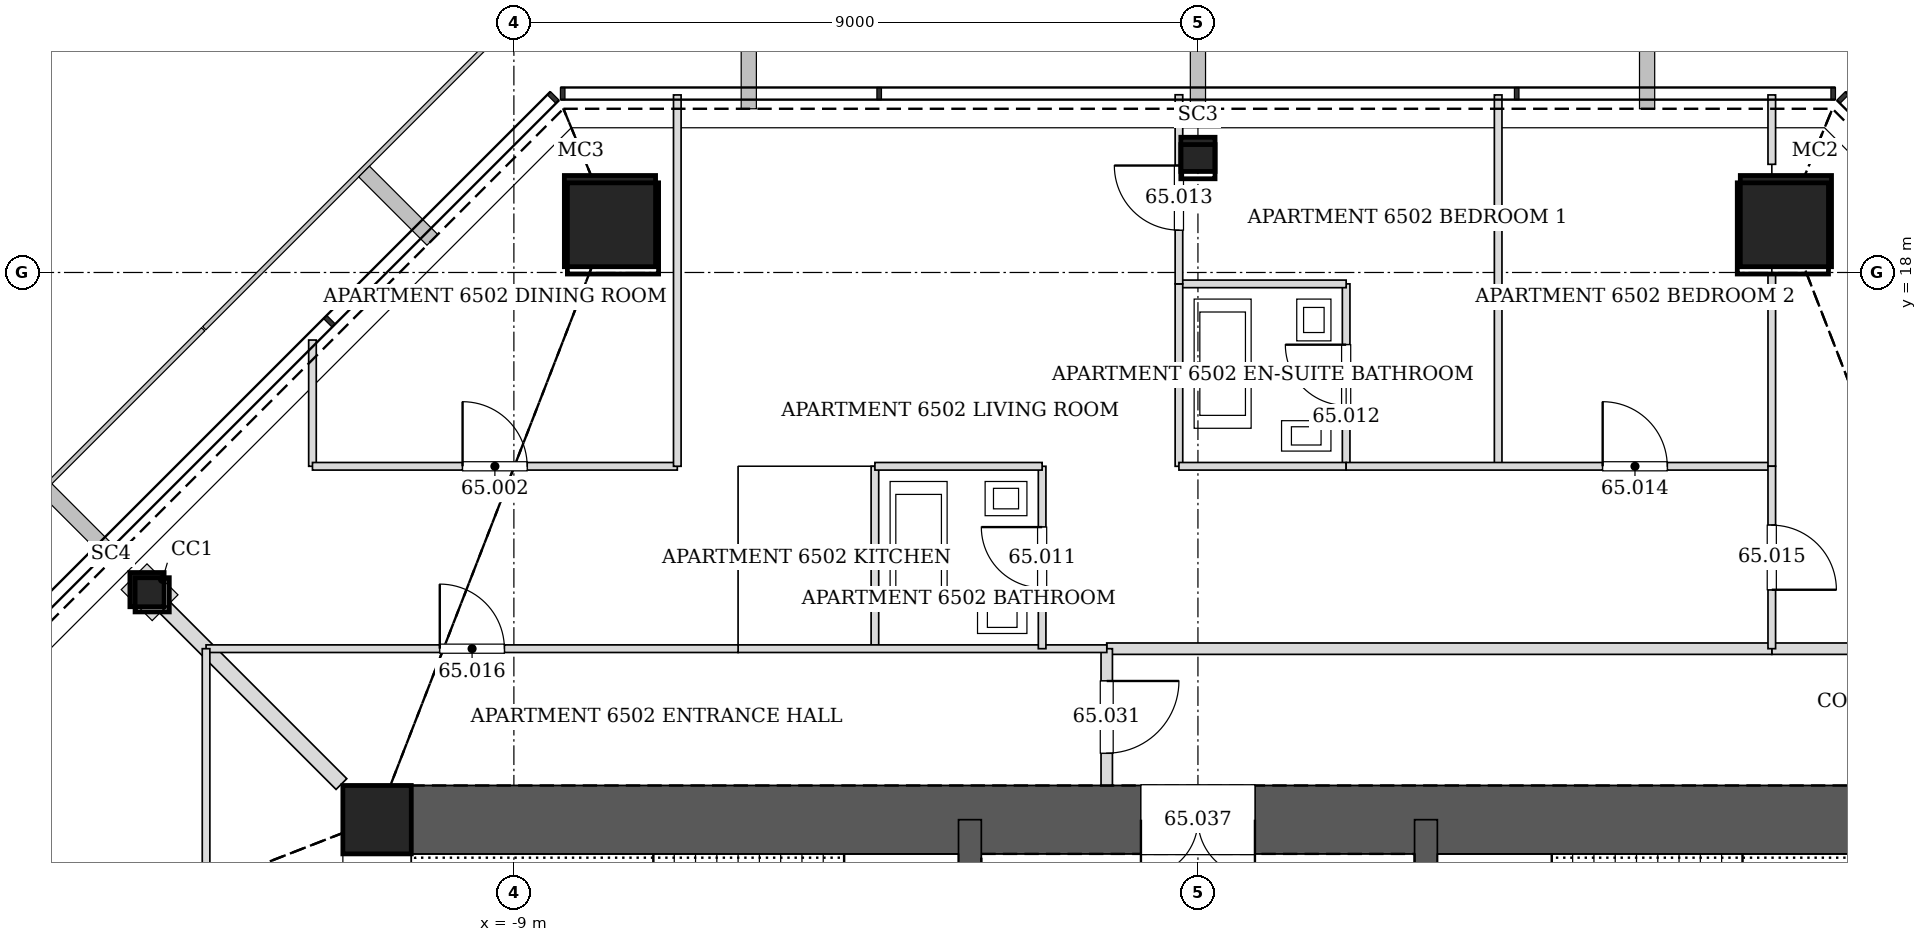
"""IFC4 building model, lengths in metres.
Left out: names, types, materials, properties, quantities, classifications, styles, units other than length and angle.
Written with IfcOpenShell. Run it as: python <this file> out.ifc"""

import sys

from ifc_helpers import new_model, si_unit, direction, frame, frame_2d, origin, origin_2d, place, context, subcontext, project, spatial, rectangle, hollow_rectangle, extrude, element, fill, save


model = new_model("IFC4")
c1 = context("Model", 3, precision=1e-05, world=origin(), true_north=direction((0.0, 1.0)))
c2 = subcontext(c1, "Body", "Model", "MODEL_VIEW")
j1 = project(units=[si_unit("LENGTHUNIT", "METRE"), si_unit("PLANEANGLEUNIT", "RADIAN")], contexts=[c1])
p1 = place(None, origin())
s1 = spatial("IfcSite", under=j1, at=p1, CompositionType="ELEMENT")
p2 = place(p1, origin())
s2 = spatial("IfcBuilding", under=s1, at=p2, CompositionType="ELEMENT")
p3 = place(p2, frame((0.0, 0.0, 270.8)))
s3 = spatial("IfcBuildingStorey", under=s2, at=p3, CompositionType="ELEMENT", Elevation=270.8)
for number, where, z_axis, x_axis in (
    (1, (7.736, 18.676, 0.0), (-0.012, -0.028, 1.0), (0.924, -0.382, 0.0)),
    (2, (-7.736, 18.676, 0.0), (0.012, -0.028, 1.0), (0.924, 0.382, 0.0)),
):
    element("IfcColumn", number, at=place(p3, frame(where, z_axis=z_axis, x_axis=x_axis)), inside=s3, PredefinedType="COLUMN", context=c2, shape_type="SweptSolid", body=[
        extrude(hollow_rectangle(XDim=1.2, YDim=1.2, WallThickness=0.055, at=origin_2d()), origin(), (0.0, 0.0, 1.0), 3.402),
    ])
for number, where, z_axis, x_axis in (
    (3, (0.0, 19.554, 0.0), (0.0, -0.028, 1.0), (1.0, 0.0, 0.0)),
    (4, (-13.827, 13.827, 0.0), (0.02, -0.02, 1.0), (0.707, 0.707, 0.0)),
):
    element("IfcColumn", number, at=place(p3, frame(where, z_axis=z_axis, x_axis=x_axis)), inside=s3, PredefinedType="COLUMN", context=c2, shape_type="SweptSolid", body=[
        extrude(hollow_rectangle(XDim=0.45, YDim=0.45, WallThickness=0.02, at=origin_2d()), origin(), (0.0, 0.0, 1.0), 3.401),
    ])
p4 = place(p3, frame((-10.8, 10.8, 0.0), z_axis=(0.0, 0.0, 1.0), x_axis=(1.0, 0.0, 0.0)))
e5 = element("IfcColumn", 5, at=p4, inside=s3, PredefinedType="COLUMN", context=c2, shape_type="SweptSolid", body=[
    extrude(hollow_rectangle(XDim=0.9, YDim=0.9, WallThickness=0.04, at=origin_2d()), origin(), (0.0, 0.0, 1.0), 3.4),
])
p5 = place(p3, frame((10.8, 10.8, 0.0), z_axis=(0.0, 0.0, 1.0), x_axis=(-1.0, 0.0, 0.0)))
e6 = element("IfcWall", 6, at=p5, inside=s3, PredefinedType="SOLIDWALL", context=c2, shape_type="SweptSolid", body=[
    extrude(rectangle(XDim=21.6, YDim=0.9, at=frame_2d((10.8, 0.0))), origin(), (0.0, 0.0, 1.0), 3.4),
])
p6 = place(p5, frame((10.05, 0.0, 0.0)))
e7 = element("IfcOpeningElement", 7, at=p6, cuts=e6, PredefinedType="OPENING", context=c2, shape_type="SweptSolid", body=[
    extrude(rectangle(XDim=1.5, YDim=2.1, at=frame_2d((0.75, 1.05))), frame((0.0, 0.46, 0.0), z_axis=(0.0, -1.0, 0.0), x_axis=(1.0, 0.0, 0.0)), (0.0, 0.0, 1.0), 0.92),
])
p7 = place(p3, frame((-10.8, 10.8, 0.0), z_axis=(0.0, 0.0, 1.0), x_axis=(0.0, -1.0, 0.0)))
e8 = element("IfcWall", 8, at=p7, inside=s3, PredefinedType="SOLIDWALL", context=c2, shape_type="SweptSolid", body=[
    extrude(rectangle(XDim=21.6, YDim=0.9, at=frame_2d((10.8, 0.0))), origin(), (0.0, 0.0, 1.0), 3.4),
])
p8 = place(p7, frame((8.7, 0.0, 0.0)))
e9 = element("IfcOpeningElement", 9, at=p8, cuts=e8, PredefinedType="OPENING", context=c2, shape_type="SweptSolid", body=[
    extrude(rectangle(XDim=1.2, YDim=2.1, at=frame_2d((0.6, 1.05))), frame((0.0, 0.46, 0.0), z_axis=(0.0, -1.0, 0.0), x_axis=(1.0, 0.0, 0.0)), (0.0, 0.0, 1.0), 0.92),
])
p9 = place(p7, frame((11.7, 0.0, 0.0)))
e10 = element("IfcOpeningElement", 10, at=p9, cuts=e8, PredefinedType="OPENING", context=c2, shape_type="SweptSolid", body=[
    extrude(rectangle(XDim=1.2, YDim=2.1, at=frame_2d((0.6, 1.05))), frame((0.0, 0.46, 0.0), z_axis=(0.0, -1.0, 0.0), x_axis=(1.0, 0.0, 0.0)), (0.0, 0.0, 1.0), 0.92),
])
p10 = place(p3, frame((-3.0, 6.0, 0.0), z_axis=(0.0, 0.0, 1.0), x_axis=(0.0, 1.0, 0.0)))
e11 = element("IfcWall", 11, at=p10, inside=s3, PredefinedType="SOLIDWALL", context=c2, shape_type="SweptSolid", body=[
    extrude(rectangle(XDim=4.8, YDim=0.3, at=frame_2d((2.4, 0.0))), origin(), (0.0, 0.0, 1.0), 3.4),
])
p11 = place(p10, frame((1.75, 0.0, 0.0)))
e12 = element("IfcOpeningElement", 12, at=p11, cuts=e11, PredefinedType="OPENING", context=c2, shape_type="SweptSolid", body=[
    extrude(rectangle(XDim=1.0, YDim=2.1, at=frame_2d((0.5, 1.05))), frame((0.0, 0.16, 0.0), z_axis=(0.0, -1.0, 0.0), x_axis=(1.0, 0.0, 0.0)), (0.0, 0.0, 1.0), 0.32),
])
p12 = place(p3, frame((3.0, 6.0, 0.0), z_axis=(0.0, 0.0, 1.0), x_axis=(0.0, 1.0, 0.0)))
e13 = element("IfcWall", 13, at=p12, inside=s3, PredefinedType="SOLIDWALL", context=c2, shape_type="SweptSolid", body=[
    extrude(rectangle(XDim=4.8, YDim=0.3, at=frame_2d((2.4, 0.0))), origin(), (0.0, 0.0, 1.0), 3.4),
])
p13 = place(p12, frame((1.75, 0.0, 0.0)))
e14 = element("IfcOpeningElement", 14, at=p13, cuts=e13, PredefinedType="OPENING", context=c2, shape_type="SweptSolid", body=[
    extrude(rectangle(XDim=1.0, YDim=2.1, at=frame_2d((0.5, 1.05))), frame((0.0, 0.16, 0.0), z_axis=(0.0, -1.0, 0.0), x_axis=(1.0, 0.0, 0.0)), (0.0, 0.0, 1.0), 0.32),
])
p14 = place(p3, frame((13.05, 13.05, 0.0), z_axis=(0.0, 0.0, 1.0), x_axis=(-1.0, 0.0, 0.0)))
e15 = element("IfcWall", 15, at=p14, inside=s3, PredefinedType="PARTITIONING", context=c2, shape_type="SweptSolid", body=[
    extrude(rectangle(XDim=5.501, YDim=0.15, at=frame_2d((2.75, 0.0))), origin(), (0.0, 0.0, 1.0), 2.349),
])
p15 = place(p3, frame((7.551, 13.05, 0.0), z_axis=(0.0, 0.0, 1.0), x_axis=(-1.0, 0.0, 0.0)))
e16 = element("IfcWall", 16, at=p15, inside=s3, PredefinedType="PARTITIONING", context=c2, shape_type="SweptSolid", body=[
    extrude(rectangle(XDim=8.751, YDim=0.15, at=frame_2d((4.375, 0.0))), origin(), (0.0, 0.0, 1.0), 2.344),
])
p16 = place(p3, frame((-1.2, 13.05, 0.0), z_axis=(0.0, 0.0, 1.0), x_axis=(0.0, -1.0, 0.0)))
e17 = element("IfcWall", 17, at=p16, inside=s3, PredefinedType="PARTITIONING", context=c2, shape_type="SweptSolid", body=[
    extrude(rectangle(XDim=1.8, YDim=0.15, at=frame_2d((0.9, 0.0))), origin(), (0.0, 0.0, 1.0), 3.2),
])
p17 = place(p16, frame((0.425, 0.0, 0.0)))
e18 = element("IfcOpeningElement", 18, at=p17, cuts=e17, PredefinedType="OPENING", context=c2, shape_type="SweptSolid", body=[
    extrude(rectangle(XDim=0.95, YDim=2.1, at=frame_2d((0.475, 1.05))), frame((0.0, 0.085, 0.0), z_axis=(0.0, -1.0, 0.0), x_axis=(1.0, 0.0, 0.0)), (0.0, 0.0, 1.0), 0.17),
])
p18 = place(p3, frame((-11.65, 17.111, 0.0), z_axis=(0.0, 0.0, 1.0), x_axis=(0.0, -1.0, 0.0)))
e19 = element("IfcWall", 19, at=p18, inside=s3, PredefinedType="PARTITIONING", context=c2, shape_type="SweptSolid", body=[
    extrude(rectangle(XDim=1.661, YDim=0.1, at=frame_2d((0.831, 0.0))), origin(), (0.0, 0.0, 1.0), 2.74),
])
p19 = place(p3, frame((-11.65, 15.45, 0.0), z_axis=(0.0, 0.0, 1.0), x_axis=(1.0, 0.0, 0.0)))
e20 = element("IfcWall", 20, at=p19, inside=s3, PredefinedType="PARTITIONING", context=c2, shape_type="SweptSolid", body=[
    extrude(rectangle(XDim=4.8, YDim=0.1, at=frame_2d((2.4, 0.0))), origin(), (0.0, 0.0, 1.0), 2.349),
])
p20 = place(p19, frame((1.975, 0.0, 0.0)))
e21 = element("IfcOpeningElement", 21, at=p20, cuts=e20, PredefinedType="OPENING", context=c2, shape_type="SweptSolid", body=[
    extrude(rectangle(XDim=0.85, YDim=2.1, at=frame_2d((0.425, 1.05))), frame((0.0, 0.06, 0.0), z_axis=(0.0, -1.0, 0.0), x_axis=(1.0, 0.0, 0.0)), (0.0, 0.0, 1.0), 0.12),
])
p21 = place(p3, frame((-6.85, 15.45, 0.0), z_axis=(0.0, 0.0, 1.0), x_axis=(0.0, 1.0, 0.0)))
e22 = element("IfcWall", 22, at=p21, inside=s3, PredefinedType="PARTITIONING", context=c2, shape_type="SweptSolid", body=[
    extrude(rectangle(XDim=4.886, YDim=0.1, at=frame_2d((2.443, 0.0))), origin(), (0.0, 0.0, 1.0), 2.591),
])
p22 = place(p3, frame((-4.25, 13.05, 0.0), z_axis=(0.0, 0.0, 1.0), x_axis=(0.0, 1.0, 0.0)))
e23 = element("IfcWall", 23, at=p22, inside=s3, PredefinedType="PARTITIONING", context=c2, shape_type="SweptSolid", body=[
    extrude(rectangle(XDim=2.4, YDim=0.1, at=frame_2d((1.2, 0.0))), origin(), (0.0, 0.0, 1.0), 2.591),
])
p23 = place(p3, frame((-6.05, 13.05, 0.0), z_axis=(0.0, 0.0, 1.0), x_axis=(1.0, 0.0, 0.0)))
e24 = element("IfcWall", 24, at=p23, inside=s3, PredefinedType="PARTITIONING", context=c2, shape_type="SweptSolid", body=[
    extrude(rectangle(XDim=4.851, YDim=0.1, at=frame_2d((2.426, 0.0))), origin(), (0.0, 0.0, 1.0), 3.2),
])
p24 = place(p3, frame((-2.05, 13.05, 0.0), z_axis=(0.0, 0.0, 1.0), x_axis=(0.0, 1.0, 0.0)))
e25 = element("IfcWall", 25, at=p24, inside=s3, PredefinedType="PARTITIONING", context=c2, shape_type="SweptSolid", body=[
    extrude(rectangle(XDim=2.4, YDim=0.1, at=frame_2d((1.2, 0.0))), origin(), (0.0, 0.0, 1.0), 2.591),
])
p25 = place(p24, frame((0.8, 0.0, 0.0)))
e26 = element("IfcOpeningElement", 26, at=p25, cuts=e25, PredefinedType="OPENING", context=c2, shape_type="SweptSolid", body=[
    extrude(rectangle(XDim=0.8, YDim=2.1, at=frame_2d((0.4, 1.05))), frame((0.0, 0.06, 0.0), z_axis=(0.0, -1.0, 0.0), x_axis=(1.0, 0.0, 0.0)), (0.0, 0.0, 1.0), 0.12),
])
p26 = place(p3, frame((-2.05, 15.45, 0.0), z_axis=(0.0, 0.0, 1.0), x_axis=(-1.0, 0.0, 0.0)))
e27 = element("IfcWall", 27, at=p26, inside=s3, PredefinedType="PARTITIONING", context=c2, shape_type="SweptSolid", body=[
    extrude(rectangle(XDim=2.2, YDim=0.1, at=frame_2d((1.1, 0.0))), origin(), (0.0, 0.0, 1.0), 3.2),
])
p27 = place(p3, frame((1.95, 15.45, 0.0), z_axis=(0.0, 0.0, 1.0), x_axis=(0.0, 1.0, 0.0)))
e28 = element("IfcWall", 28, at=p27, inside=s3, PredefinedType="PARTITIONING", context=c2, shape_type="SweptSolid", body=[
    extrude(rectangle(XDim=2.4, YDim=0.1, at=frame_2d((1.2, 0.0))), origin(), (0.0, 0.0, 1.0), 2.591),
])
p28 = place(p27, frame((0.8, 0.0, 0.0)))
e29 = element("IfcOpeningElement", 29, at=p28, cuts=e28, PredefinedType="OPENING", context=c2, shape_type="SweptSolid", body=[
    extrude(rectangle(XDim=0.8, YDim=2.1, at=frame_2d((0.4, 1.05))), frame((0.0, 0.06, 0.0), z_axis=(0.0, -1.0, 0.0), x_axis=(1.0, 0.0, 0.0)), (0.0, 0.0, 1.0), 0.12),
])
p29 = place(p3, frame((1.95, 17.85, 0.0), z_axis=(0.0, 0.0, 1.0), x_axis=(-1.0, 0.0, 0.0)))
e30 = element("IfcWall", 30, at=p29, inside=s3, PredefinedType="PARTITIONING", context=c2, shape_type="SweptSolid", body=[
    extrude(rectangle(XDim=2.2, YDim=0.1, at=frame_2d((1.1, 0.0))), origin(), (0.0, 0.0, 1.0), 2.344),
])
p30 = place(p3, frame((-0.25, 17.85, 0.0), z_axis=(0.0, 0.0, 1.0), x_axis=(0.0, -1.0, 0.0)))
e31 = element("IfcWall", 31, at=p30, inside=s3, PredefinedType="PARTITIONING", context=c2, shape_type="SweptSolid", body=[
    extrude(rectangle(XDim=2.4, YDim=0.1, at=frame_2d((1.2, 0.0))), origin(), (0.0, 0.0, 1.0), 2.591),
])
p31 = place(p3, frame((-0.25, 15.45, 0.0), z_axis=(0.0, 0.0, 1.0), x_axis=(1.0, 0.0, 0.0)))
e32 = element("IfcWall", 32, at=p31, inside=s3, PredefinedType="PARTITIONING", context=c2, shape_type="SweptSolid", body=[
    extrude(rectangle(XDim=2.2, YDim=0.1, at=frame_2d((1.1, 0.0))), origin(), (0.0, 0.0, 1.0), 2.344),
])
p32 = place(p3, frame((3.95, 15.45, 0.0), z_axis=(0.0, 0.0, 1.0), x_axis=(0.0, 1.0, 0.0)))
e33 = element("IfcWall", 33, at=p32, inside=s3, PredefinedType="PARTITIONING", context=c2, shape_type="SweptSolid", body=[
    extrude(rectangle(XDim=4.886, YDim=0.1, at=frame_2d((2.443, 0.0))), origin(), (0.0, 0.0, 1.0), 2.591),
])
p33 = place(p3, frame((-0.25, 20.338, 0.0), z_axis=(0.0, 0.0, 1.0), x_axis=(0.0, -1.0, 0.0)))
e34 = element("IfcWall", 34, at=p33, inside=s3, PredefinedType="PARTITIONING", context=c2, shape_type="SweptSolid", body=[
    extrude(rectangle(XDim=2.488, YDim=0.1, at=frame_2d((1.244, 0.0))), origin(), (0.0, 0.0, 1.0), 2.74),
])
p34 = place(p33, frame((0.931, 0.0, 0.0)))
e35 = element("IfcOpeningElement", 35, at=p34, cuts=e34, PredefinedType="OPENING", context=c2, shape_type="SweptSolid", body=[
    extrude(rectangle(XDim=0.85, YDim=2.1, at=frame_2d((0.425, 1.05))), frame((0.0, 0.06, 0.0), z_axis=(0.0, -1.0, 0.0), x_axis=(1.0, 0.0, 0.0)), (0.0, 0.0, 1.0), 0.12),
])
p35 = place(p3, frame((1.95, 15.45, 0.0), z_axis=(0.0, 0.0, 1.0), x_axis=(1.0, 0.0, 0.0)))
e36 = element("IfcWall", 36, at=p35, inside=s3, PredefinedType="PARTITIONING", context=c2, shape_type="SweptSolid", body=[
    extrude(rectangle(XDim=5.6, YDim=0.1, at=frame_2d((2.8, 0.0))), origin(), (0.0, 0.0, 1.0), 3.2),
])
p36 = place(p35, frame((3.375, 0.0, 0.0)))
e37 = element("IfcOpeningElement", 37, at=p36, cuts=e36, PredefinedType="OPENING", context=c2, shape_type="SweptSolid", body=[
    extrude(rectangle(XDim=0.85, YDim=2.1, at=frame_2d((0.425, 1.05))), frame((0.0, 0.06, 0.0), z_axis=(0.0, -1.0, 0.0), x_axis=(1.0, 0.0, 0.0)), (0.0, 0.0, 1.0), 0.12),
])
p37 = place(p3, frame((7.55, 15.45, 0.0), z_axis=(0.0, 0.0, 1.0), x_axis=(0.0, 1.0, 0.0)))
e38 = element("IfcWall", 38, at=p37, inside=s3, PredefinedType="PARTITIONING", context=c2, shape_type="SweptSolid", body=[
    extrude(rectangle(XDim=2.52, YDim=0.1, at=frame_2d((1.26, 0.0))), origin(), (0.0, 0.0, 1.0), 2.591),
])
p38 = place(p3, frame((7.55, 19.423, 0.0), z_axis=(0.0, 0.0, 1.0), x_axis=(0.0, 1.0, 0.0)))
e39 = element("IfcWall", 39, at=p38, inside=s3, PredefinedType="PARTITIONING", context=c2, shape_type="SweptSolid", body=[
    extrude(rectangle(XDim=0.913, YDim=0.1, at=frame_2d((0.457, 0.0))), origin(), (0.0, 0.0, 1.0), 3.2),
])
p39 = place(p3, frame((7.55, 15.451, 0.0), z_axis=(0.0, 0.0, 1.0), x_axis=(0.0, -1.0, 0.0)))
e40 = element("IfcWall", 40, at=p39, inside=s3, PredefinedType="PARTITIONING", context=c2, shape_type="SweptSolid", body=[
    extrude(rectangle(XDim=2.401, YDim=0.1, at=frame_2d((1.2, 0.0))), origin(), (0.0, 0.0, 1.0), 2.591),
])
p40 = place(p39, frame((0.775, 0.0, 0.0)))
e41 = element("IfcOpeningElement", 41, at=p40, cuts=e40, PredefinedType="OPENING", context=c2, shape_type="SweptSolid", body=[
    extrude(rectangle(XDim=0.85, YDim=2.1, at=frame_2d((0.425, 1.05))), frame((0.0, 0.06, 0.0), z_axis=(0.0, -1.0, 0.0), x_axis=(1.0, 0.0, 0.0)), (0.0, 0.0, 1.0), 0.12),
])
p41 = place(p3, frame((-13.586, 13.586, 0.0), z_axis=(0.0, 0.0, 1.0), x_axis=(0.707106781187, -0.707106781187, 0.0)))
e42 = element("IfcWall", 42, at=p41, inside=s3, PredefinedType="PARTITIONING", context=c2, shape_type="SweptSolid", body=[
    extrude(rectangle(XDim=3.277, YDim=0.2, at=frame_2d((1.638, 0.0))), origin(), (0.0, 0.0, 1.0), 2.591),
])
p42 = place(p3, frame((-13.05, 13.05, 0.0), z_axis=(0.0, 0.0, 1.0), x_axis=(1.0, 0.0, 0.0)))
e43 = element("IfcWall", 43, at=p42, inside=s3, PredefinedType="PARTITIONING", context=c2, shape_type="SweptSolid", body=[
    extrude(rectangle(XDim=7.0, YDim=0.1, at=frame_2d((3.5, 0.0))), origin(), (0.0, 0.0, 1.0), 2.349),
])
p43 = place(p42, frame((3.075, 0.0, 0.0)))
e44 = element("IfcOpeningElement", 44, at=p43, cuts=e43, PredefinedType="OPENING", context=c2, shape_type="SweptSolid", body=[
    extrude(rectangle(XDim=0.85, YDim=2.1, at=frame_2d((0.425, 1.05))), frame((0.0, 0.06, 0.0), z_axis=(0.0, -1.0, 0.0), x_axis=(1.0, 0.0, 0.0)), (0.0, 0.0, 1.0), 0.12),
])
p44 = place(p3, frame((-13.05, 6.05, 0.0), z_axis=(0.0, 0.0, 1.0), x_axis=(0.0, 1.0, 0.0)))
e45 = element("IfcWall", 45, at=p44, inside=s3, PredefinedType="PARTITIONING", context=c2, shape_type="SweptSolid", body=[
    extrude(rectangle(XDim=7.0, YDim=0.1, at=frame_2d((3.5, 0.0))), origin(), (0.0, 0.0, 1.0), 2.349),
])
p45 = place(p44, frame((3.075, 0.0, 0.0)))
e46 = element("IfcOpeningElement", 46, at=p45, cuts=e45, PredefinedType="OPENING", context=c2, shape_type="SweptSolid", body=[
    extrude(rectangle(XDim=0.85, YDim=2.1, at=frame_2d((0.425, 1.05))), frame((0.0, 0.06, 0.0), z_axis=(0.0, -1.0, 0.0), x_axis=(1.0, 0.0, 0.0)), (0.0, 0.0, 1.0), 0.12),
])
p46 = place(p20, origin())
e47 = element("IfcDoor", 47, at=p46, inside=s3, OperationType="SINGLE_SWING_LEFT", PredefinedType="DOOR", context=c2, shape_type="SweptSolid", body=[
    extrude(rectangle(XDim=0.85, YDim=2.1, at=frame_2d((0.425, 1.05))), frame((0.0, 0.025, 0.0), z_axis=(0.0, -1.0, 0.0), x_axis=(1.0, 0.0, 0.0)), (0.0, 0.0, 1.0), 0.05),
])
fill(e21, e47)
p47 = place(p25, origin())
e48 = element("IfcDoor", 48, at=p47, inside=s3, OperationType="SINGLE_SWING_RIGHT", PredefinedType="DOOR", context=c2, shape_type="SweptSolid", body=[
    extrude(rectangle(XDim=0.8, YDim=2.1, at=frame_2d((0.4, 1.05))), frame((0.0, 0.025, 0.0), z_axis=(0.0, -1.0, 0.0), x_axis=(1.0, 0.0, 0.0)), (0.0, 0.0, 1.0), 0.05),
])
fill(e26, e48)
p48 = place(p28, origin())
e49 = element("IfcDoor", 49, at=p48, inside=s3, OperationType="SINGLE_SWING_RIGHT", PredefinedType="DOOR", context=c2, shape_type="SweptSolid", body=[
    extrude(rectangle(XDim=0.8, YDim=2.1, at=frame_2d((0.4, 1.05))), frame((0.0, 0.025, 0.0), z_axis=(0.0, -1.0, 0.0), x_axis=(1.0, 0.0, 0.0)), (0.0, 0.0, 1.0), 0.05),
])
fill(e29, e49)
p49 = place(p34, frame((0.85, 0.0, 0.0), z_axis=(0.0, 0.0, 1.0), x_axis=(-1.0, 0.0, 0.0)))
e50 = element("IfcDoor", 50, at=p49, inside=s3, OperationType="SINGLE_SWING_RIGHT", PredefinedType="DOOR", context=c2, shape_type="SweptSolid", body=[
    extrude(rectangle(XDim=0.85, YDim=2.1, at=frame_2d((0.425, 1.05))), frame((0.0, 0.025, 0.0), z_axis=(0.0, -1.0, 0.0), x_axis=(1.0, 0.0, 0.0)), (0.0, 0.0, 1.0), 0.05),
])
fill(e35, e50)
p50 = place(p36, origin())
e51 = element("IfcDoor", 51, at=p50, inside=s3, OperationType="SINGLE_SWING_LEFT", PredefinedType="DOOR", context=c2, shape_type="SweptSolid", body=[
    extrude(rectangle(XDim=0.85, YDim=2.1, at=frame_2d((0.425, 1.05))), frame((0.0, 0.025, 0.0), z_axis=(0.0, -1.0, 0.0), x_axis=(1.0, 0.0, 0.0)), (0.0, 0.0, 1.0), 0.05),
])
fill(e37, e51)
p51 = place(p40, origin())
e52 = element("IfcDoor", 52, at=p51, inside=s3, OperationType="SINGLE_SWING_RIGHT", PredefinedType="DOOR", context=c2, shape_type="SweptSolid", body=[
    extrude(rectangle(XDim=0.85, YDim=2.1, at=frame_2d((0.425, 1.05))), frame((0.0, 0.025, 0.0), z_axis=(0.0, -1.0, 0.0), x_axis=(1.0, 0.0, 0.0)), (0.0, 0.0, 1.0), 0.05),
])
fill(e41, e52)
p52 = place(p43, origin())
e53 = element("IfcDoor", 53, at=p52, inside=s3, OperationType="SINGLE_SWING_LEFT", PredefinedType="DOOR", context=c2, shape_type="SweptSolid", body=[
    extrude(rectangle(XDim=0.85, YDim=2.1, at=frame_2d((0.425, 1.05))), frame((0.0, 0.025, 0.0), z_axis=(0.0, -1.0, 0.0), x_axis=(1.0, 0.0, 0.0)), (0.0, 0.0, 1.0), 0.05),
])
fill(e44, e53)
p53 = place(p17, origin())
e54 = element("IfcDoor", 54, at=p53, inside=s3, OperationType="SINGLE_SWING_LEFT", PredefinedType="DOOR", context=c2, shape_type="SweptSolid", body=[
    extrude(rectangle(XDim=0.95, YDim=2.1, at=frame_2d((0.475, 1.05))), frame((0.0, 0.025, 0.0), z_axis=(0.0, -1.0, 0.0), x_axis=(1.0, 0.0, 0.0)), (0.0, 0.0, 1.0), 0.05),
])
fill(e18, e54)
p54 = place(p6, origin())
e55 = element("IfcDoor", 55, at=p54, inside=s3, OperationType="DOUBLE_DOOR_SINGLE_SWING", PredefinedType="DOOR", context=c2, shape_type="SweptSolid", body=[
    extrude(rectangle(XDim=1.5, YDim=2.1, at=frame_2d((0.75, 1.05))), frame((0.0, 0.025, 0.0), z_axis=(0.0, -1.0, 0.0), x_axis=(1.0, 0.0, 0.0)), (0.0, 0.0, 1.0), 0.05),
])
fill(e7, e55)
save(model, sys.argv[1])
